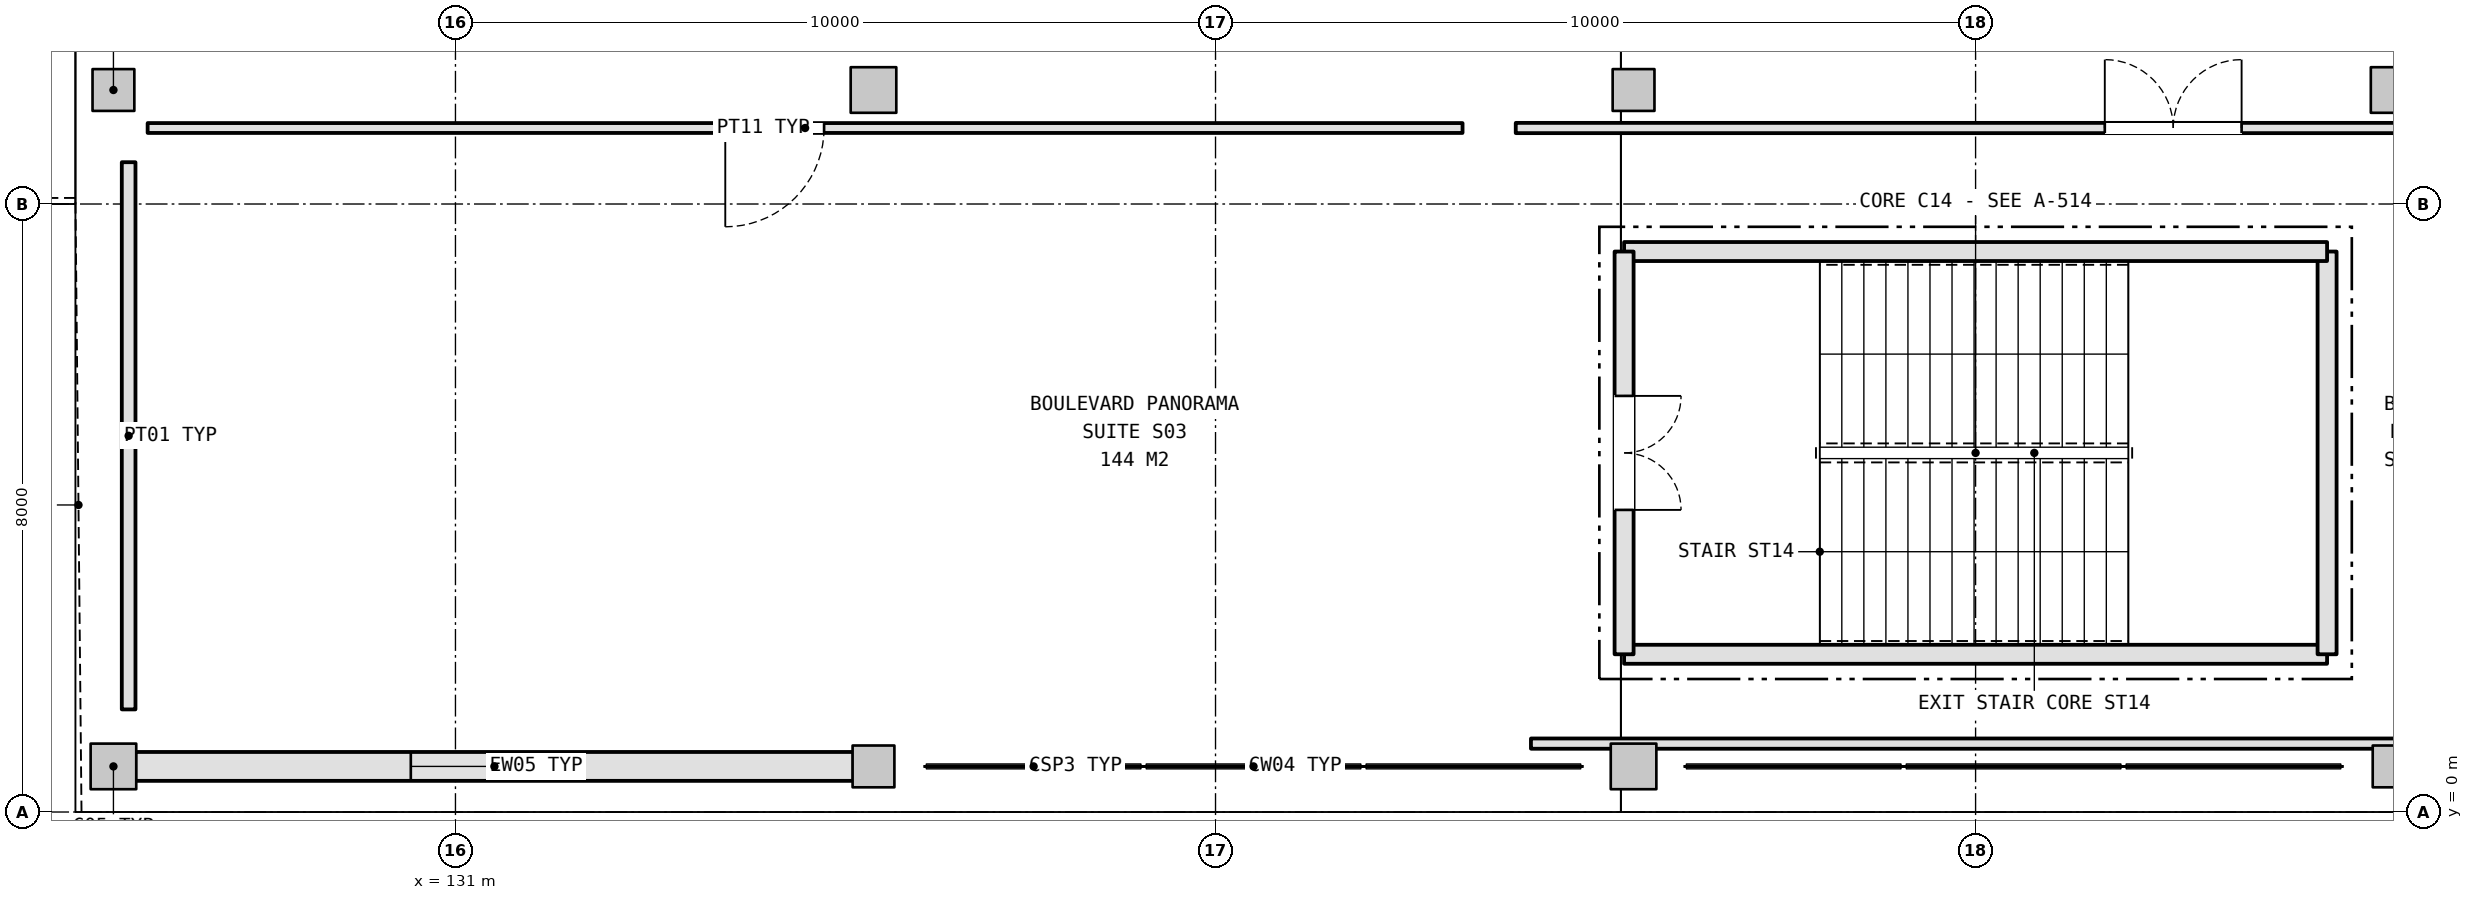
"""IFC4 building model, lengths in metres.
Left out: names, types, materials, properties, quantities, classifications, styles, units other than length and angle.
Written with IfcOpenShell. Run it as: python <this file> out.ifc"""

import sys

from ifc_helpers import new_model, si_unit, direction, frame, frame_2d, origin, origin_2d, place, context, subcontext, project, spatial, rectangle, extrude, element, fill, save


model = new_model("IFC4")
c1 = context("Model", 3, precision=1e-05, world=origin(), true_north=direction((0.0, 1.0)))
c2 = subcontext(c1, "Body", "Model", "MODEL_VIEW")
j1 = project(units=[si_unit("LENGTHUNIT", "METRE"), si_unit("PLANEANGLEUNIT", "RADIAN")], contexts=[c1])
p1 = place(None, origin())
s1 = spatial("IfcSite", under=j1, at=p1, CompositionType="ELEMENT")
p2 = place(p1, origin())
s2 = spatial("IfcBuilding", under=s1, at=p2, CompositionType="ELEMENT")
p3 = place(p2, frame((0.0, 0.0, 16.2)))
s3 = spatial("IfcBuildingStorey", under=s2, at=p3, CompositionType="ELEMENT", Elevation=16.2)
p4 = place(p3, frame((126.5, 0.6, 0.0), z_axis=(0.0, 0.0, 1.0), x_axis=(1.0, 0.0, 0.0)))
e1 = element("IfcColumn", 1, at=p4, inside=s3, PredefinedType="COLUMN", context=c2, shape_type="SweptSolid", body=[
    extrude(rectangle(XDim=0.6, YDim=0.6, at=origin_2d()), origin(), (0.0, 0.0, 1.0), 5.4),
])
for number, where, z_axis, x_axis in (
    (2, (126.5, 9.5, 0.0), (0.0, 0.0, 1.0), (1.0, 0.0, 0.0)),
    (3, (136.5, 0.6, 0.0), (0.0, 0.0, 1.0), (1.0, 0.0, 0.0)),
):
    element("IfcColumn", number, at=place(p3, frame(where, z_axis=z_axis, x_axis=x_axis)), inside=s3, PredefinedType="COLUMN", context=c2, shape_type="SweptSolid", body=[
        extrude(rectangle(XDim=0.55, YDim=0.55, at=origin_2d()), origin(), (0.0, 0.0, 1.0), 5.4),
    ])
for number, where, z_axis, x_axis in (
    (4, (136.5, 9.5, 0.0), (0.0, 0.0, 1.0), (1.0, 0.0, 0.0)),
    (5, (146.5, 0.6, 0.0), (0.0, 0.0, 1.0), (1.0, 0.0, 0.0)),
):
    element("IfcColumn", number, at=place(p3, frame(where, z_axis=z_axis, x_axis=x_axis)), inside=s3, PredefinedType="COLUMN", context=c2, shape_type="SweptSolid", body=[
        extrude(rectangle(XDim=0.6, YDim=0.6, at=origin_2d()), origin(), (0.0, 0.0, 1.0), 5.4),
    ])
for number, where, z_axis, x_axis in (
    (6, (146.5, 9.5, 0.0), (0.0, 0.0, 1.0), (1.0, 0.0, 0.0)),
    (7, (156.5, 0.6, 0.0), (0.0, 0.0, 1.0), (1.0, 0.0, 0.0)),
):
    element("IfcColumn", number, at=place(p3, frame(where, z_axis=z_axis, x_axis=x_axis)), inside=s3, PredefinedType="COLUMN", context=c2, shape_type="SweptSolid", body=[
        extrude(rectangle(XDim=0.55, YDim=0.55, at=origin_2d()), origin(), (0.0, 0.0, 1.0), 5.4),
    ])
p5 = place(p3, frame((156.5, 9.5, 0.0), z_axis=(0.0, 0.0, 1.0), x_axis=(1.0, 0.0, 0.0)))
e8 = element("IfcColumn", 8, at=p5, inside=s3, PredefinedType="COLUMN", context=c2, shape_type="SweptSolid", body=[
    extrude(rectangle(XDim=0.6, YDim=0.6, at=origin_2d()), origin(), (0.0, 0.0, 1.0), 5.4),
])
p6 = place(p3, frame((126.788, 0.6, 0.0), z_axis=(0.0, 0.0, 1.0), x_axis=(1.0, 0.0, 0.0)))
e9 = element("IfcWall", 9, at=p6, inside=s3, PredefinedType="SOLIDWALL", context=c2, shape_type="SweptSolid", body=[
    extrude(rectangle(XDim=9.449, YDim=0.38, at=frame_2d((4.725, 0.0))), origin(), (0.0, 0.0, 1.0), 4.405),
])
p7 = place(p6, frame((3.625, 0.0, 1.05)))
e10 = element("IfcOpeningElement", 10, at=p7, cuts=e9, PredefinedType="OPENING", context=c2, shape_type="SweptSolid", body=[
    extrude(rectangle(XDim=2.2, YDim=1.8, at=frame_2d((1.1, 0.9))), frame((0.0, 0.2, 0.0), z_axis=(0.0, -1.0, 0.0), x_axis=(1.0, 0.0, 0.0)), (0.0, 0.0, 1.0), 0.4),
])
p8 = place(p3, frame((146.375, 2.075, 0.0), z_axis=(0.0, 0.0, 1.0), x_axis=(1.0, 0.0, 0.0)))
e11 = element("IfcWall", 11, at=p8, inside=s3, PredefinedType="SHEAR", context=c2, shape_type="SweptSolid", body=[
    extrude(rectangle(XDim=9.249, YDim=0.25, at=frame_2d((4.625, 0.0))), origin(), (0.0, 0.0, 1.0), 5.14),
])
p9 = place(p3, frame((155.625, 2.075, 0.0), z_axis=(0.0, 0.0, 1.0), x_axis=(0.0, 1.0, 0.0)))
e12 = element("IfcWall", 12, at=p9, inside=s3, PredefinedType="SHEAR", context=c2, shape_type="SweptSolid", body=[
    extrude(rectangle(XDim=5.299, YDim=0.25, at=frame_2d((2.649, 0.0))), origin(), (0.0, 0.0, 1.0), 5.14),
])
p10 = place(p3, frame((155.625, 7.375, 0.0), z_axis=(0.0, 0.0, 1.0), x_axis=(-1.0, 0.0, 0.0)))
e13 = element("IfcWall", 13, at=p10, inside=s3, PredefinedType="SHEAR", context=c2, shape_type="SweptSolid", body=[
    extrude(rectangle(XDim=9.249, YDim=0.25, at=frame_2d((4.625, 0.0))), origin(), (0.0, 0.0, 1.0), 5.14),
])
p11 = place(p3, frame((146.375, 7.375, 0.0), z_axis=(0.0, 0.0, 1.0), x_axis=(0.0, -1.0, 0.0)))
e14 = element("IfcWall", 14, at=p11, inside=s3, PredefinedType="SHEAR", context=c2, shape_type="SweptSolid", body=[
    extrude(rectangle(XDim=5.299, YDim=0.25, at=frame_2d((2.649, 0.0))), origin(), (0.0, 0.0, 1.0), 5.14),
])
p12 = place(p11, frame((1.9, 0.0, 0.0)))
e15 = element("IfcOpeningElement", 15, at=p12, cuts=e14, PredefinedType="OPENING", context=c2, shape_type="SweptSolid", body=[
    extrude(rectangle(XDim=1.5, YDim=2.2, at=frame_2d((0.75, 1.1))), frame((0.0, 0.135, 0.0), z_axis=(0.0, -1.0, 0.0), x_axis=(1.0, 0.0, 0.0)), (0.0, 0.0, 1.0), 0.27),
])
p13 = place(p3, frame((126.95, 9.0, 0.0), z_axis=(0.0, 0.0, 1.0), x_axis=(1.0, 0.0, 0.0)))
e16 = element("IfcWall", 16, at=p13, inside=s3, PredefinedType="PARTITIONING", context=c2, shape_type="SweptSolid", body=[
    extrude(rectangle(XDim=17.3, YDim=0.13, at=frame_2d((8.65, 0.0))), origin(), (0.0, 0.0, 1.0), 4.405),
])
p14 = place(p13, frame((7.6, 0.0, 0.0)))
e17 = element("IfcOpeningElement", 17, at=p14, cuts=e16, PredefinedType="OPENING", context=c2, shape_type="SweptSolid", body=[
    extrude(rectangle(XDim=1.3, YDim=2.2, at=frame_2d((0.65, 1.1))), frame((0.0, 0.075, 0.0), z_axis=(0.0, -1.0, 0.0), x_axis=(1.0, 0.0, 0.0)), (0.0, 0.0, 1.0), 0.15),
])
p15 = place(p3, frame((126.7, 1.35, 0.0), z_axis=(0.0, 0.0, 1.0), x_axis=(0.0, 1.0, 0.0)))
e18 = element("IfcWall", 18, at=p15, inside=s3, PredefinedType="PARTITIONING", context=c2, shape_type="SweptSolid", body=[
    extrude(rectangle(XDim=7.2, YDim=0.18, at=frame_2d((3.6, 0.0))), origin(), (0.0, 0.0, 1.0), 4.455),
])
p16 = place(p3, frame((144.95, 9.0, 0.0), z_axis=(0.0, 0.0, 1.0), x_axis=(1.0, 0.0, 0.0)))
e19 = element("IfcWall", 19, at=p16, inside=s3, PredefinedType="PARTITIONING", context=c2, shape_type="SweptSolid", body=[
    extrude(rectangle(XDim=17.3, YDim=0.135, at=frame_2d((8.65, 0.0))), origin(), (0.0, 0.0, 1.0), 4.405),
])
p17 = place(p16, frame((7.75, 0.0, 0.0)))
e20 = element("IfcOpeningElement", 20, at=p17, cuts=e19, PredefinedType="OPENING", context=c2, shape_type="SweptSolid", body=[
    extrude(rectangle(XDim=1.8, YDim=2.2, at=frame_2d((0.9, 1.1))), frame((0.0, 0.077, 0.0), z_axis=(0.0, -1.0, 0.0), x_axis=(1.0, 0.0, 0.0)), (0.0, 0.0, 1.0), 0.155),
])
p18 = place(p3, frame((162.05, 0.9, 0.0), z_axis=(0.0, 0.0, 1.0), x_axis=(-1.0, 0.0, 0.0)))
e21 = element("IfcWall", 21, at=p18, inside=s3, PredefinedType="PARTITIONING", context=c2, shape_type="SweptSolid", body=[
    extrude(rectangle(XDim=16.9, YDim=0.135, at=frame_2d((8.45, 0.0))), origin(), (0.0, 0.0, 1.0), 4.405),
])
p19 = place(p7, origin())
e22 = element("IfcWindow", 22, at=p19, inside=s3, PartitioningType="SINGLE_PANEL", PredefinedType="WINDOW", context=c2, shape_type="SweptSolid", body=[
    extrude(rectangle(XDim=2.2, YDim=1.8, at=frame_2d((1.1, 0.9))), frame((0.0, 0.03, 0.0), z_axis=(0.0, -1.0, 0.0), x_axis=(1.0, 0.0, 0.0)), (0.0, 0.0, 1.0), 0.06),
])
fill(e10, e22)
p20 = place(p12, origin())
e23 = element("IfcDoor", 23, at=p20, inside=s3, OperationType="DOUBLE_DOOR_SINGLE_SWING", PredefinedType="DOOR", context=c2, shape_type="SweptSolid", body=[
    extrude(rectangle(XDim=1.5, YDim=2.2, at=frame_2d((0.75, 1.1))), frame((0.0, 0.025, 0.0), z_axis=(0.0, -1.0, 0.0), x_axis=(1.0, 0.0, 0.0)), (0.0, 0.0, 1.0), 0.05),
])
fill(e15, e23)
p21 = place(p14, frame((1.3, 0.0, 0.0), z_axis=(0.0, 0.0, 1.0), x_axis=(-1.0, 0.0, 0.0)))
e24 = element("IfcDoor", 24, at=p21, inside=s3, OperationType="SINGLE_SWING_LEFT", PredefinedType="DOOR", context=c2, shape_type="SweptSolid", body=[
    extrude(rectangle(XDim=1.3, YDim=2.2, at=frame_2d((0.65, 1.1))), frame((0.0, 0.025, 0.0), z_axis=(0.0, -1.0, 0.0), x_axis=(1.0, 0.0, 0.0)), (0.0, 0.0, 1.0), 0.05),
])
fill(e17, e24)
p22 = place(p17, origin())
e25 = element("IfcDoor", 25, at=p22, inside=s3, OperationType="DOUBLE_DOOR_SINGLE_SWING", PredefinedType="DOOR", context=c2, shape_type="SweptSolid", body=[
    extrude(rectangle(XDim=1.8, YDim=2.2, at=frame_2d((0.9, 1.1))), frame((0.0, 0.025, 0.0), z_axis=(0.0, -1.0, 0.0), x_axis=(1.0, 0.0, 0.0)), (0.0, 0.0, 1.0), 0.05),
])
fill(e20, e25)
save(model, sys.argv[1])
